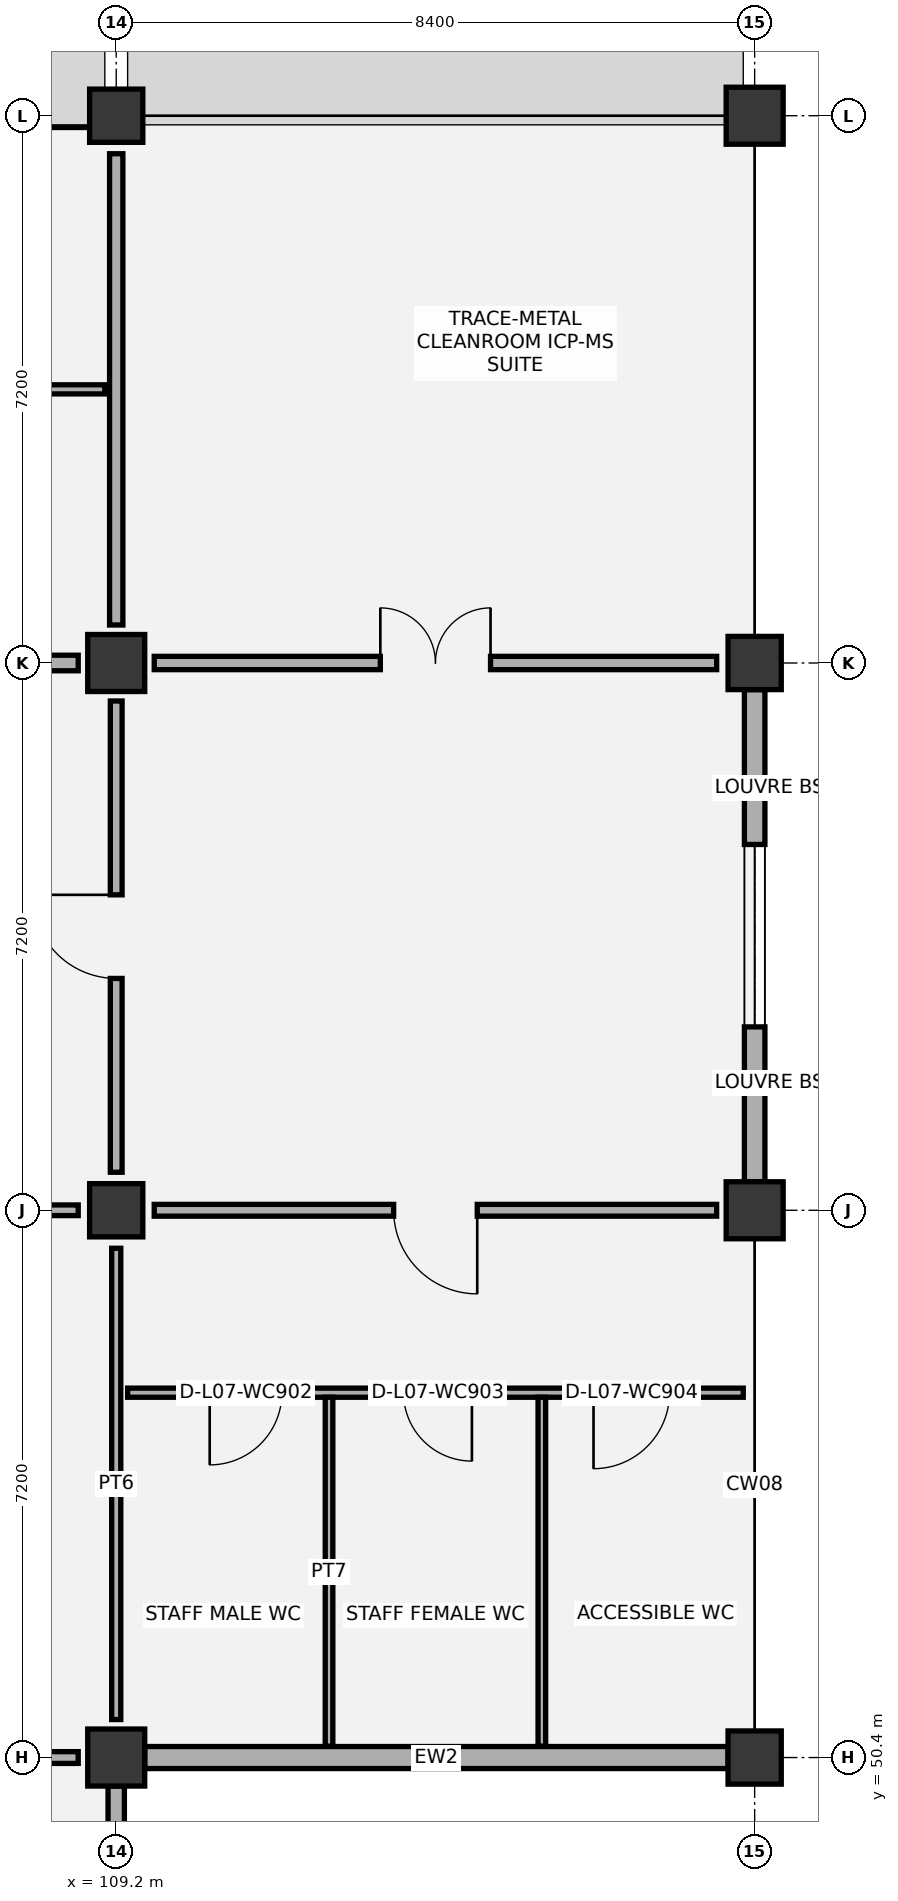
"""IFC4 building model, lengths in metres.
Left out: names, types, materials, properties, quantities, classifications, styles, units other than length and angle.
Written with IfcOpenShell. Run it as: python <this file> out.ifc"""

import sys

from ifc_helpers import new_model, si_unit, direction, frame, frame_2d, origin, origin_2d, place, context, subcontext, project, spatial, rectangle, extrude, element, fill, save


model = new_model("IFC4")
c1 = context("Model", 3, precision=1e-05, world=origin(), true_north=direction((0.0, 1.0)))
c2 = subcontext(c1, "Body", "Model", "MODEL_VIEW")
j1 = project(units=[si_unit("LENGTHUNIT", "METRE"), si_unit("PLANEANGLEUNIT", "RADIAN")], contexts=[c1])
p1 = place(None, origin())
s1 = spatial("IfcSite", under=j1, at=p1, CompositionType="ELEMENT")
p2 = place(p1, origin())
s2 = spatial("IfcBuilding", under=s1, at=p2, CompositionType="ELEMENT")
p3 = place(p2, frame((0.0, 0.0, 35.4)))
s3 = spatial("IfcBuildingStorey", under=s2, at=p3, CompositionType="ELEMENT", Elevation=35.4)
p4 = place(p3, frame((109.2, 50.4, 0.0), z_axis=(0.0, 0.0, 1.0), x_axis=(1.0, 0.0, 0.0)))
e1 = element("IfcColumn", 1, at=p4, inside=s3, PredefinedType="COLUMN", context=c2, shape_type="SweptSolid", body=[
    extrude(rectangle(XDim=0.75, YDim=0.75, at=origin_2d()), origin(), (0.0, 0.0, 1.0), 4.2),
])
p5 = place(p3, frame((109.2, 57.6, 0.0), z_axis=(0.0, 0.0, 1.0), x_axis=(1.0, 0.0, 0.0)))
e2 = element("IfcColumn", 2, at=p5, inside=s3, PredefinedType="COLUMN", context=c2, shape_type="SweptSolid", body=[
    extrude(rectangle(XDim=0.7, YDim=0.7, at=origin_2d()), origin(), (0.0, 0.0, 1.0), 4.2),
])
p6 = place(p3, frame((109.2, 64.8, 0.0), z_axis=(0.0, 0.0, 1.0), x_axis=(1.0, 0.0, 0.0)))
e3 = element("IfcColumn", 3, at=p6, inside=s3, PredefinedType="COLUMN", context=c2, shape_type="SweptSolid", body=[
    extrude(rectangle(XDim=0.75, YDim=0.75, at=origin_2d()), origin(), (0.0, 0.0, 1.0), 4.2),
])
for number, where, z_axis, x_axis in (
    (4, (109.2, 72.0, 0.0), (0.0, 0.0, 1.0), (1.0, 0.0, 0.0)),
    (5, (117.6, 50.4, 0.0), (0.0, 0.0, 1.0), (1.0, 0.0, 0.0)),
):
    element("IfcColumn", number, at=place(p3, frame(where, z_axis=z_axis, x_axis=x_axis)), inside=s3, PredefinedType="COLUMN", context=c2, shape_type="SweptSolid", body=[
        extrude(rectangle(XDim=0.7, YDim=0.7, at=origin_2d()), origin(), (0.0, 0.0, 1.0), 4.2),
    ])
p7 = place(p3, frame((117.6, 57.6, 0.0), z_axis=(0.0, 0.0, 1.0), x_axis=(1.0, 0.0, 0.0)))
e6 = element("IfcColumn", 6, at=p7, inside=s3, PredefinedType="COLUMN", context=c2, shape_type="SweptSolid", body=[
    extrude(rectangle(XDim=0.75, YDim=0.75, at=origin_2d()), origin(), (0.0, 0.0, 1.0), 4.2),
])
p8 = place(p3, frame((117.6, 64.8, 0.0), z_axis=(0.0, 0.0, 1.0), x_axis=(1.0, 0.0, 0.0)))
e7 = element("IfcColumn", 7, at=p8, inside=s3, PredefinedType="COLUMN", context=c2, shape_type="SweptSolid", body=[
    extrude(rectangle(XDim=0.7, YDim=0.7, at=origin_2d()), origin(), (0.0, 0.0, 1.0), 4.2),
])
p9 = place(p3, frame((117.6, 72.0, 0.0), z_axis=(0.0, 0.0, 1.0), x_axis=(1.0, 0.0, 0.0)))
e8 = element("IfcColumn", 8, at=p9, inside=s3, PredefinedType="COLUMN", context=c2, shape_type="SweptSolid", body=[
    extrude(rectangle(XDim=0.75, YDim=0.75, at=origin_2d()), origin(), (0.0, 0.0, 1.0), 4.2),
])
p10 = place(p3, frame((109.2, 43.55, 0.0), z_axis=(0.0, 0.0, 1.0), x_axis=(0.0, 1.0, 0.0)))
e9 = element("IfcWall", 9, at=p10, inside=s3, PredefinedType="SOLIDWALL", context=c2, shape_type="SweptSolid", body=[
    extrude(rectangle(XDim=6.475, YDim=0.215, at=frame_2d((3.237, 0.0))), origin(), (0.0, 0.0, 1.0), 3.365),
])
p11 = place(p10, frame((1.158, 0.0, 0.9)))
e10 = element("IfcOpeningElement", 10, at=p11, cuts=e9, PredefinedType="OPENING", context=c2, shape_type="SweptSolid", body=[
    extrude(rectangle(XDim=1.5, YDim=1.8, at=frame_2d((0.75, 0.9))), frame((0.0, 0.117, 0.0), z_axis=(0.0, -1.0, 0.0), x_axis=(1.0, 0.0, 0.0)), (0.0, 0.0, 1.0), 0.235),
])
p12 = place(p10, frame((3.817, 0.0, 0.9)))
e11 = element("IfcOpeningElement", 11, at=p12, cuts=e9, PredefinedType="OPENING", context=c2, shape_type="SweptSolid", body=[
    extrude(rectangle(XDim=1.5, YDim=1.8, at=frame_2d((0.75, 0.9))), frame((0.0, 0.117, 0.0), z_axis=(0.0, -1.0, 0.0), x_axis=(1.0, 0.0, 0.0)), (0.0, 0.0, 1.0), 0.235),
])
p13 = place(p3, frame((101.175, 72.0, 0.0), z_axis=(0.0, 0.0, 1.0), x_axis=(1.0, 0.0, 0.0)))
e12 = element("IfcWall", 12, at=p13, inside=s3, PredefinedType="SOLIDWALL", context=c2, shape_type="SweptSolid", body=[
    extrude(rectangle(XDim=7.675, YDim=0.31, at=frame_2d((3.837, 0.0))), origin(), (0.0, 0.0, 1.0), 3.365),
])
p14 = place(p13, frame((1.358, 0.0, 0.9)))
e13 = element("IfcOpeningElement", 13, at=p14, cuts=e12, PredefinedType="OPENING", context=c2, shape_type="SweptSolid", body=[
    extrude(rectangle(XDim=1.8, YDim=1.8, at=frame_2d((0.9, 0.9))), frame((0.0, 0.165, 0.0), z_axis=(0.0, -1.0, 0.0), x_axis=(1.0, 0.0, 0.0)), (0.0, 0.0, 1.0), 0.33),
])
p15 = place(p13, frame((4.517, 0.0, 0.9)))
e14 = element("IfcOpeningElement", 14, at=p15, cuts=e12, PredefinedType="OPENING", context=c2, shape_type="SweptSolid", body=[
    extrude(rectangle(XDim=1.8, YDim=1.8, at=frame_2d((0.9, 0.9))), frame((0.0, 0.165, 0.0), z_axis=(0.0, -1.0, 0.0), x_axis=(1.0, 0.0, 0.0)), (0.0, 0.0, 1.0), 0.33),
])
p16 = place(p3, frame((109.575, 50.4, 0.0), z_axis=(0.0, 0.0, 1.0), x_axis=(1.0, 0.0, 0.0)))
e15 = element("IfcWall", 15, at=p16, inside=s3, PredefinedType="SOLIDWALL", context=c2, shape_type="SweptSolid", body=[
    extrude(rectangle(XDim=7.675, YDim=0.29, at=frame_2d((3.837, 0.0))), origin(), (0.0, 0.0, 1.0), 3.365),
])
p17 = place(p3, frame((117.6, 57.975, 0.0), z_axis=(0.0, 0.0, 1.0), x_axis=(0.0, 1.0, 0.0)))
e16 = element("IfcWall", 16, at=p17, inside=s3, PredefinedType="SOLIDWALL", context=c2, shape_type="SweptSolid", body=[
    extrude(rectangle(XDim=6.475, YDim=0.27, at=frame_2d((3.237, 0.0))), origin(), (0.0, 0.0, 1.0), 3.365),
])
p18 = place(p17, frame((2.038, 0.0, 0.9)))
e17 = element("IfcOpeningElement", 17, at=p18, cuts=e16, PredefinedType="OPENING", context=c2, shape_type="SweptSolid", body=[
    extrude(rectangle(XDim=2.4, YDim=1.8, at=frame_2d((1.2, 0.9))), frame((0.0, 0.145, 0.0), z_axis=(0.0, -1.0, 0.0), x_axis=(1.0, 0.0, 0.0)), (0.0, 0.0, 1.0), 0.29),
])
p19 = place(p3, frame((117.6, 43.32, 0.0), z_axis=(0.0, 0.0, 1.0), x_axis=(0.0, 1.0, 0.0)))
e18 = element("IfcWall", 18, at=p19, inside=s3, PredefinedType="PARAPET", context=c2, shape_type="SweptSolid", body=[
    extrude(rectangle(XDim=6.96, YDim=0.185, at=frame_2d((3.48, 0.0))), origin(), (0.0, 0.0, 1.0), 1.15),
])
p20 = place(p3, frame((109.35, 55.2, 0.0), z_axis=(0.0, 0.0, 1.0), x_axis=(1.0, 0.0, 0.0)))
e19 = element("IfcWall", 19, at=p20, inside=s3, PredefinedType="PARTITIONING", context=c2, shape_type="SweptSolid", body=[
    extrude(rectangle(XDim=8.1, YDim=0.12, at=frame_2d((4.05, 0.0))), origin(), (0.0, 0.0, 1.0), 3.92),
])
p21 = place(p20, frame((1.08, 0.0, 0.0)))
e20 = element("IfcOpeningElement", 20, at=p21, cuts=e19, PredefinedType="OPENING", context=c2, shape_type="SweptSolid", body=[
    extrude(rectangle(XDim=0.95, YDim=2.1, at=frame_2d((0.475, 1.05))), frame((0.0, 0.07, 0.0), z_axis=(0.0, -1.0, 0.0), x_axis=(1.0, 0.0, 0.0)), (0.0, 0.0, 1.0), 0.14),
])
p22 = place(p20, frame((3.63, 0.0, 0.0)))
e21 = element("IfcOpeningElement", 21, at=p22, cuts=e19, PredefinedType="OPENING", context=c2, shape_type="SweptSolid", body=[
    extrude(rectangle(XDim=0.9, YDim=2.1, at=frame_2d((0.45, 1.05))), frame((0.0, 0.07, 0.0), z_axis=(0.0, -1.0, 0.0), x_axis=(1.0, 0.0, 0.0)), (0.0, 0.0, 1.0), 0.14),
])
p23 = place(p20, frame((6.13, 0.0, 0.0)))
e22 = element("IfcOpeningElement", 22, at=p23, cuts=e19, PredefinedType="OPENING", context=c2, shape_type="SweptSolid", body=[
    extrude(rectangle(XDim=1.0, YDim=2.1, at=frame_2d((0.5, 1.05))), frame((0.0, 0.07, 0.0), z_axis=(0.0, -1.0, 0.0), x_axis=(1.0, 0.0, 0.0)), (0.0, 0.0, 1.0), 0.14),
])
for number, where, z_axis, x_axis in (
    (23, (112.0, 50.55, 0.0), (0.0, 0.0, 1.0), (0.0, 1.0, 0.0)),
    (24, (114.8, 50.55, 0.0), (0.0, 0.0, 1.0), (0.0, 1.0, 0.0)),
):
    element("IfcWall", number, at=place(p3, frame(where, z_axis=z_axis, x_axis=x_axis)), inside=s3, PredefinedType="PARTITIONING", context=c2, shape_type="SweptSolid", body=[
        extrude(rectangle(XDim=4.59, YDim=0.1, at=frame_2d((2.295, 0.0))), origin(), (0.0, 0.0, 1.0), 3.92),
    ])
p24 = place(p3, frame((100.95, 68.4, 0.0), z_axis=(0.0, 0.0, 1.0), x_axis=(1.0, 0.0, 0.0)))
e25 = element("IfcWall", 25, at=p24, inside=s3, PredefinedType="PARTITIONING", context=c2, shape_type="SweptSolid", body=[
    extrude(rectangle(XDim=8.1, YDim=0.12, at=frame_2d((4.05, 0.0))), origin(), (0.0, 0.0, 1.0), 3.92),
])
p25 = place(p24, frame((3.55, 0.0, 0.0)))
e26 = element("IfcOpeningElement", 26, at=p25, cuts=e25, PredefinedType="OPENING", context=c2, shape_type="SweptSolid", body=[
    extrude(rectangle(XDim=1.6, YDim=2.2, at=frame_2d((0.8, 1.1))), frame((0.0, 0.07, 0.0), z_axis=(0.0, -1.0, 0.0), x_axis=(1.0, 0.0, 0.0)), (0.0, 0.0, 1.0), 0.14),
])
p26 = place(p3, frame((101.3, 50.4, 0.0), z_axis=(0.0, 0.0, 1.0), x_axis=(1.0, 0.0, 0.0)))
e27 = element("IfcWall", 27, at=p26, inside=s3, PredefinedType="PARTITIONING", context=c2, shape_type="SweptSolid", body=[
    extrude(rectangle(XDim=7.4, YDim=0.155, at=frame_2d((3.7, 0.0))), origin(), (0.0, 0.0, 1.0), 3.315),
])
p27 = place(p26, frame((3.15, 0.0, 0.0)))
e28 = element("IfcOpeningElement", 28, at=p27, cuts=e27, PredefinedType="OPENING", context=c2, shape_type="SweptSolid", body=[
    extrude(rectangle(XDim=1.1, YDim=2.1, at=frame_2d((0.55, 1.05))), frame((0.0, 0.087, 0.0), z_axis=(0.0, -1.0, 0.0), x_axis=(1.0, 0.0, 0.0)), (0.0, 0.0, 1.0), 0.175),
])
p28 = place(p3, frame((109.2, 50.9, 0.0), z_axis=(0.0, 0.0, 1.0), x_axis=(0.0, 1.0, 0.0)))
e29 = element("IfcWall", 29, at=p28, inside=s3, PredefinedType="PARTITIONING", context=c2, shape_type="SweptSolid", body=[
    extrude(rectangle(XDim=6.2, YDim=0.12, at=frame_2d((3.1, 0.0))), origin(), (0.0, 0.0, 1.0), 3.315),
])
p29 = place(p3, frame((101.3, 57.6, 0.0), z_axis=(0.0, 0.0, 1.0), x_axis=(1.0, 0.0, 0.0)))
e30 = element("IfcWall", 30, at=p29, inside=s3, PredefinedType="PARTITIONING", context=c2, shape_type="SweptSolid", body=[
    extrude(rectangle(XDim=7.4, YDim=0.14, at=frame_2d((3.7, 0.0))), origin(), (0.0, 0.0, 1.0), 3.315),
])
p30 = place(p29, frame((3.125, 0.0, 0.0)))
e31 = element("IfcOpeningElement", 31, at=p30, cuts=e30, PredefinedType="OPENING", context=c2, shape_type="SweptSolid", body=[
    extrude(rectangle(XDim=1.15, YDim=2.1, at=frame_2d((0.575, 1.05))), frame((0.0, 0.08, 0.0), z_axis=(0.0, -1.0, 0.0), x_axis=(1.0, 0.0, 0.0)), (0.0, 0.0, 1.0), 0.16),
])
p31 = place(p3, frame((109.2, 58.1, 0.0), z_axis=(0.0, 0.0, 1.0), x_axis=(0.0, 1.0, 0.0)))
e32 = element("IfcWall", 32, at=p31, inside=s3, PredefinedType="PARTITIONING", context=c2, shape_type="SweptSolid", body=[
    extrude(rectangle(XDim=6.2, YDim=0.155, at=frame_2d((3.1, 0.0))), origin(), (0.0, 0.0, 1.0), 3.415),
])
p32 = place(p31, frame((2.55, 0.0, 0.0)))
e33 = element("IfcOpeningElement", 33, at=p32, cuts=e32, PredefinedType="OPENING", context=c2, shape_type="SweptSolid", body=[
    extrude(rectangle(XDim=1.1, YDim=2.1, at=frame_2d((0.55, 1.05))), frame((0.0, 0.087, 0.0), z_axis=(0.0, -1.0, 0.0), x_axis=(1.0, 0.0, 0.0)), (0.0, 0.0, 1.0), 0.175),
])
p33 = place(p3, frame((101.3, 64.8, 0.0), z_axis=(0.0, 0.0, 1.0), x_axis=(1.0, 0.0, 0.0)))
e34 = element("IfcWall", 34, at=p33, inside=s3, PredefinedType="PARTITIONING", context=c2, shape_type="SweptSolid", body=[
    extrude(rectangle(XDim=7.4, YDim=0.205, at=frame_2d((3.7, 0.0))), origin(), (0.0, 0.0, 1.0), 3.315),
])
p34 = place(p33, frame((2.95, 0.0, 0.0)))
e35 = element("IfcOpeningElement", 35, at=p34, cuts=e34, PredefinedType="OPENING", context=c2, shape_type="SweptSolid", body=[
    extrude(rectangle(XDim=1.5, YDim=2.2, at=frame_2d((0.75, 1.1))), frame((0.0, 0.113, 0.0), z_axis=(0.0, -1.0, 0.0), x_axis=(1.0, 0.0, 0.0)), (0.0, 0.0, 1.0), 0.225),
])
p35 = place(p3, frame((109.2, 65.3, 0.0), z_axis=(0.0, 0.0, 1.0), x_axis=(0.0, 1.0, 0.0)))
e36 = element("IfcWall", 36, at=p35, inside=s3, PredefinedType="PARTITIONING", context=c2, shape_type="SweptSolid", body=[
    extrude(rectangle(XDim=6.2, YDim=0.175, at=frame_2d((3.1, 0.0))), origin(), (0.0, 0.0, 1.0), 3.315),
])
p36 = place(p3, frame((109.7, 57.6, 0.0), z_axis=(0.0, 0.0, 1.0), x_axis=(1.0, 0.0, 0.0)))
e37 = element("IfcWall", 37, at=p36, inside=s3, PredefinedType="PARTITIONING", context=c2, shape_type="SweptSolid", body=[
    extrude(rectangle(XDim=7.4, YDim=0.155, at=frame_2d((3.7, 0.0))), origin(), (0.0, 0.0, 1.0), 3.265),
])
p37 = place(p36, frame((3.15, 0.0, 0.0)))
e38 = element("IfcOpeningElement", 38, at=p37, cuts=e37, PredefinedType="OPENING", context=c2, shape_type="SweptSolid", body=[
    extrude(rectangle(XDim=1.1, YDim=2.1, at=frame_2d((0.55, 1.05))), frame((0.0, 0.087, 0.0), z_axis=(0.0, -1.0, 0.0), x_axis=(1.0, 0.0, 0.0)), (0.0, 0.0, 1.0), 0.175),
])
p38 = place(p3, frame((109.7, 64.8, 0.0), z_axis=(0.0, 0.0, 1.0), x_axis=(1.0, 0.0, 0.0)))
e39 = element("IfcWall", 39, at=p38, inside=s3, PredefinedType="PARTITIONING", context=c2, shape_type="SweptSolid", body=[
    extrude(rectangle(XDim=7.4, YDim=0.175, at=frame_2d((3.7, 0.0))), origin(), (0.0, 0.0, 1.0), 3.265),
])
p39 = place(p38, frame((2.975, 0.0, 0.0)))
e40 = element("IfcOpeningElement", 40, at=p39, cuts=e39, PredefinedType="OPENING", context=c2, shape_type="SweptSolid", body=[
    extrude(rectangle(XDim=1.45, YDim=2.2, at=frame_2d((0.725, 1.1))), frame((0.0, 0.097, 0.0), z_axis=(0.0, -1.0, 0.0), x_axis=(1.0, 0.0, 0.0)), (0.0, 0.0, 1.0), 0.195),
])
p40 = place(p18, origin())
e41 = element("IfcWindow", 41, at=p40, inside=s3, PartitioningType="SINGLE_PANEL", PredefinedType="WINDOW", context=c2, shape_type="SweptSolid", body=[
    extrude(rectangle(XDim=2.4, YDim=1.8, at=frame_2d((1.2, 0.9))), frame((0.0, 0.03, 0.0), z_axis=(0.0, -1.0, 0.0), x_axis=(1.0, 0.0, 0.0)), (0.0, 0.0, 1.0), 0.06),
])
fill(e17, e41)
p41 = place(p21, frame((0.95, 0.0, 0.0), z_axis=(0.0, 0.0, 1.0), x_axis=(-1.0, 0.0, 0.0)))
e42 = element("IfcDoor", 42, at=p41, inside=s3, OperationType="SINGLE_SWING_RIGHT", PredefinedType="DOOR", context=c2, shape_type="SweptSolid", body=[
    extrude(rectangle(XDim=0.95, YDim=2.1, at=frame_2d((0.475, 1.05))), frame((0.0, 0.025, 0.0), z_axis=(0.0, -1.0, 0.0), x_axis=(1.0, 0.0, 0.0)), (0.0, 0.0, 1.0), 0.05),
])
fill(e20, e42)
p42 = place(p22, frame((0.9, 0.0, 0.0), z_axis=(0.0, 0.0, 1.0), x_axis=(-1.0, 0.0, 0.0)))
e43 = element("IfcDoor", 43, at=p42, inside=s3, OperationType="SINGLE_SWING_LEFT", PredefinedType="DOOR", context=c2, shape_type="SweptSolid", body=[
    extrude(rectangle(XDim=0.9, YDim=2.1, at=frame_2d((0.45, 1.05))), frame((0.0, 0.025, 0.0), z_axis=(0.0, -1.0, 0.0), x_axis=(1.0, 0.0, 0.0)), (0.0, 0.0, 1.0), 0.05),
])
fill(e21, e43)
p43 = place(p23, frame((1.0, 0.0, 0.0), z_axis=(0.0, 0.0, 1.0), x_axis=(-1.0, 0.0, 0.0)))
e44 = element("IfcDoor", 44, at=p43, inside=s3, OperationType="SINGLE_SWING_RIGHT", PredefinedType="DOOR", context=c2, shape_type="SweptSolid", body=[
    extrude(rectangle(XDim=1.0, YDim=2.1, at=frame_2d((0.5, 1.05))), frame((0.0, 0.025, 0.0), z_axis=(0.0, -1.0, 0.0), x_axis=(1.0, 0.0, 0.0)), (0.0, 0.0, 1.0), 0.05),
])
fill(e22, e44)
p44 = place(p32, origin())
e45 = element("IfcDoor", 45, at=p44, inside=s3, OperationType="SINGLE_SWING_RIGHT", PredefinedType="DOOR", context=c2, shape_type="SweptSolid", body=[
    extrude(rectangle(XDim=1.1, YDim=2.1, at=frame_2d((0.55, 1.05))), frame((0.0, 0.025, 0.0), z_axis=(0.0, -1.0, 0.0), x_axis=(1.0, 0.0, 0.0)), (0.0, 0.0, 1.0), 0.05),
])
fill(e33, e45)
p45 = place(p37, frame((1.1, 0.0, 0.0), z_axis=(0.0, 0.0, 1.0), x_axis=(-1.0, 0.0, 0.0)))
e46 = element("IfcDoor", 46, at=p45, inside=s3, OperationType="SINGLE_SWING_LEFT", PredefinedType="DOOR", context=c2, shape_type="SweptSolid", body=[
    extrude(rectangle(XDim=1.1, YDim=2.1, at=frame_2d((0.55, 1.05))), frame((0.0, 0.025, 0.0), z_axis=(0.0, -1.0, 0.0), x_axis=(1.0, 0.0, 0.0)), (0.0, 0.0, 1.0), 0.05),
])
fill(e38, e46)
p46 = place(p39, origin())
e47 = element("IfcDoor", 47, at=p46, inside=s3, OperationType="DOUBLE_DOOR_SINGLE_SWING", PredefinedType="DOOR", context=c2, shape_type="SweptSolid", body=[
    extrude(rectangle(XDim=1.45, YDim=2.2, at=frame_2d((0.725, 1.1))), frame((0.0, 0.025, 0.0), z_axis=(0.0, -1.0, 0.0), x_axis=(1.0, 0.0, 0.0)), (0.0, 0.0, 1.0), 0.05),
])
fill(e40, e47)
save(model, sys.argv[1])
